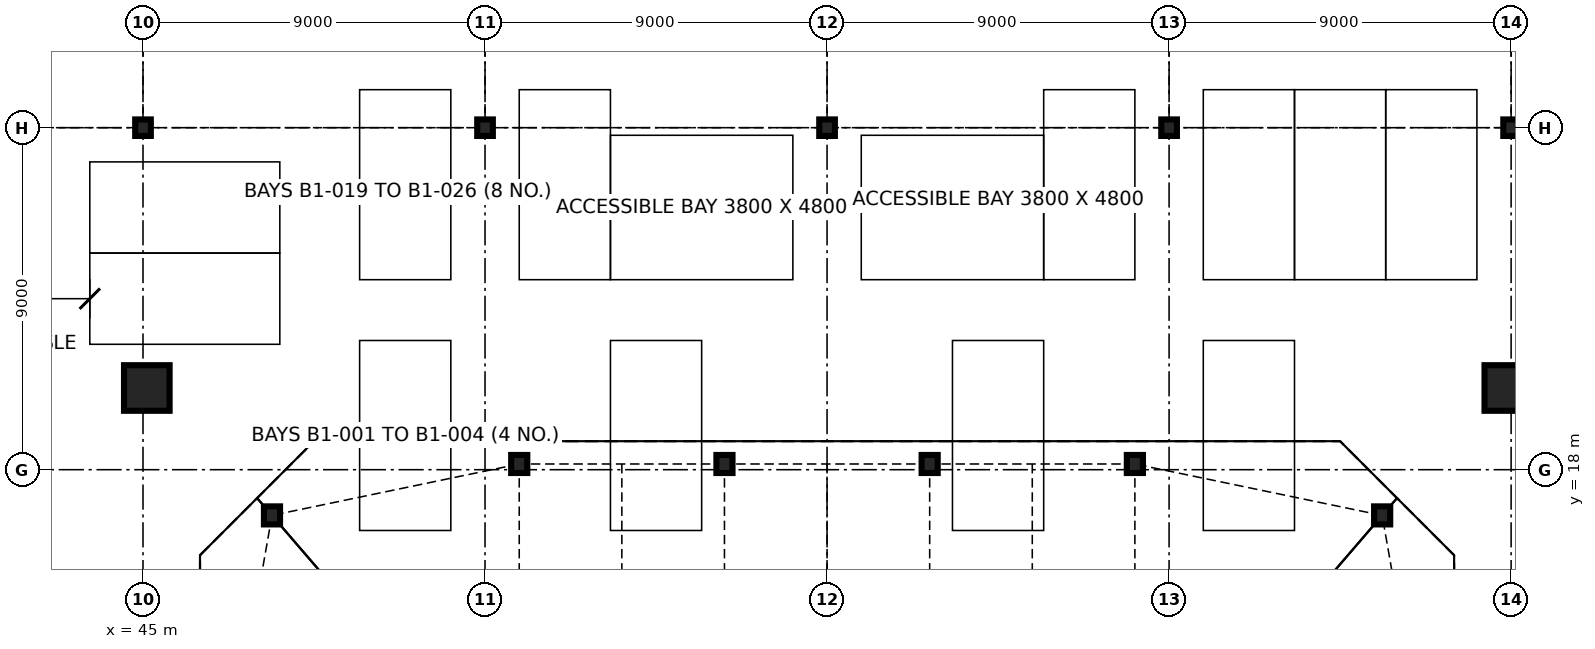
"""IFC4 building model, lengths in metres.
Left out: names, types, materials, properties, quantities, classifications, styles, units other than length and angle.
Written with IfcOpenShell. Run it as: python <this file> out.ifc"""

import sys

from ifc_helpers import new_model, si_unit, direction, frame, origin, origin_2d, place, context, subcontext, project, spatial, hollow_rectangle, i_section, extrude, element, save


model = new_model("IFC4")
c1 = context("Model", 3, precision=1e-05, world=origin(), true_north=direction((0.0, 1.0)))
c2 = subcontext(c1, "Body", "Model", "MODEL_VIEW")
j1 = project(units=[si_unit("LENGTHUNIT", "METRE"), si_unit("PLANEANGLEUNIT", "RADIAN")], contexts=[c1])
p1 = place(None, origin())
s1 = spatial("IfcSite", under=j1, at=p1, CompositionType="ELEMENT")
p2 = place(p1, origin())
s2 = spatial("IfcBuilding", under=s1, at=p2, CompositionType="ELEMENT")
p3 = place(p2, frame((0.0, 0.0, -3.6)))
s3 = spatial("IfcBuildingStorey", under=s2, at=p3, CompositionType="ELEMENT", Elevation=-3.6)
for number, where, z_axis, x_axis in (
    (1, (77.606, 16.797, 0.0), (0.0, 0.0, 1.0), (1.0, 0.0, 0.0)),
    (2, (71.1, 18.15, 0.0), (0.0, 0.0, 1.0), (1.0, 0.0, 0.0)),
    (3, (65.7, 18.15, 0.0), (0.0, 0.0, 1.0), (1.0, 0.0, 0.0)),
    (4, (60.3, 18.15, 0.0), (0.0, 0.0, 1.0), (1.0, 0.0, 0.0)),
    (5, (54.9, 18.15, 0.0), (0.0, 0.0, 1.0), (1.0, 0.0, 0.0)),
    (6, (48.394, 16.797, 0.0), (0.0, 0.0, 1.0), (1.0, 0.0, 0.0)),
):
    element("IfcColumn", number, at=place(p3, frame(where, z_axis=z_axis, x_axis=x_axis)), inside=s3, PredefinedType="COLUMN", context=c2, shape_type="SweptSolid", body=[
        extrude(i_section(OverallWidth=0.424, OverallDepth=0.475, WebThickness=0.048, FlangeThickness=0.077, at=origin_2d()), origin(), (0.0, 0.0, 1.0), 3.6),
    ])
for number, where, z_axis, x_axis in (
    (7, (80.9, 20.15, 0.0), (0.0, 0.0, 1.0), (1.0, 0.0, 0.0)),
    (8, (45.1, 20.15, 0.0), (0.0, 0.0, 1.0), (1.0, 0.0, 0.0)),
):
    element("IfcColumn", number, at=place(p3, frame(where, z_axis=z_axis, x_axis=x_axis)), inside=s3, PredefinedType="COLUMN", context=c2, shape_type="SweptSolid", body=[
        extrude(hollow_rectangle(XDim=1.2, YDim=1.2, WallThickness=0.07, at=origin_2d()), origin(), (0.0, 0.0, 1.0), 3.6),
    ])
for number, where, z_axis, x_axis in (
    (9, (45.0, 27.0, 0.0), (0.0, 0.0, 1.0), (1.0, 0.0, 0.0)),
    (10, (54.0, 27.0, 0.0), (0.0, 0.0, 1.0), (1.0, 0.0, 0.0)),
    (11, (63.0, 27.0, 0.0), (0.0, 0.0, 1.0), (1.0, 0.0, 0.0)),
    (12, (72.0, 27.0, 0.0), (0.0, 0.0, 1.0), (1.0, 0.0, 0.0)),
    (13, (81.0, 27.0, 0.0), (0.0, 0.0, 1.0), (1.0, 0.0, 0.0)),
):
    element("IfcColumn", number, at=place(p3, frame(where, z_axis=z_axis, x_axis=x_axis)), inside=s3, PredefinedType="COLUMN", context=c2, shape_type="SweptSolid", body=[
        extrude(i_section(OverallWidth=0.411, OverallDepth=0.434, WebThickness=0.036, FlangeThickness=0.057, at=origin_2d()), origin(), (0.0, 0.0, 1.0), 3.6),
    ])
save(model, sys.argv[1])
